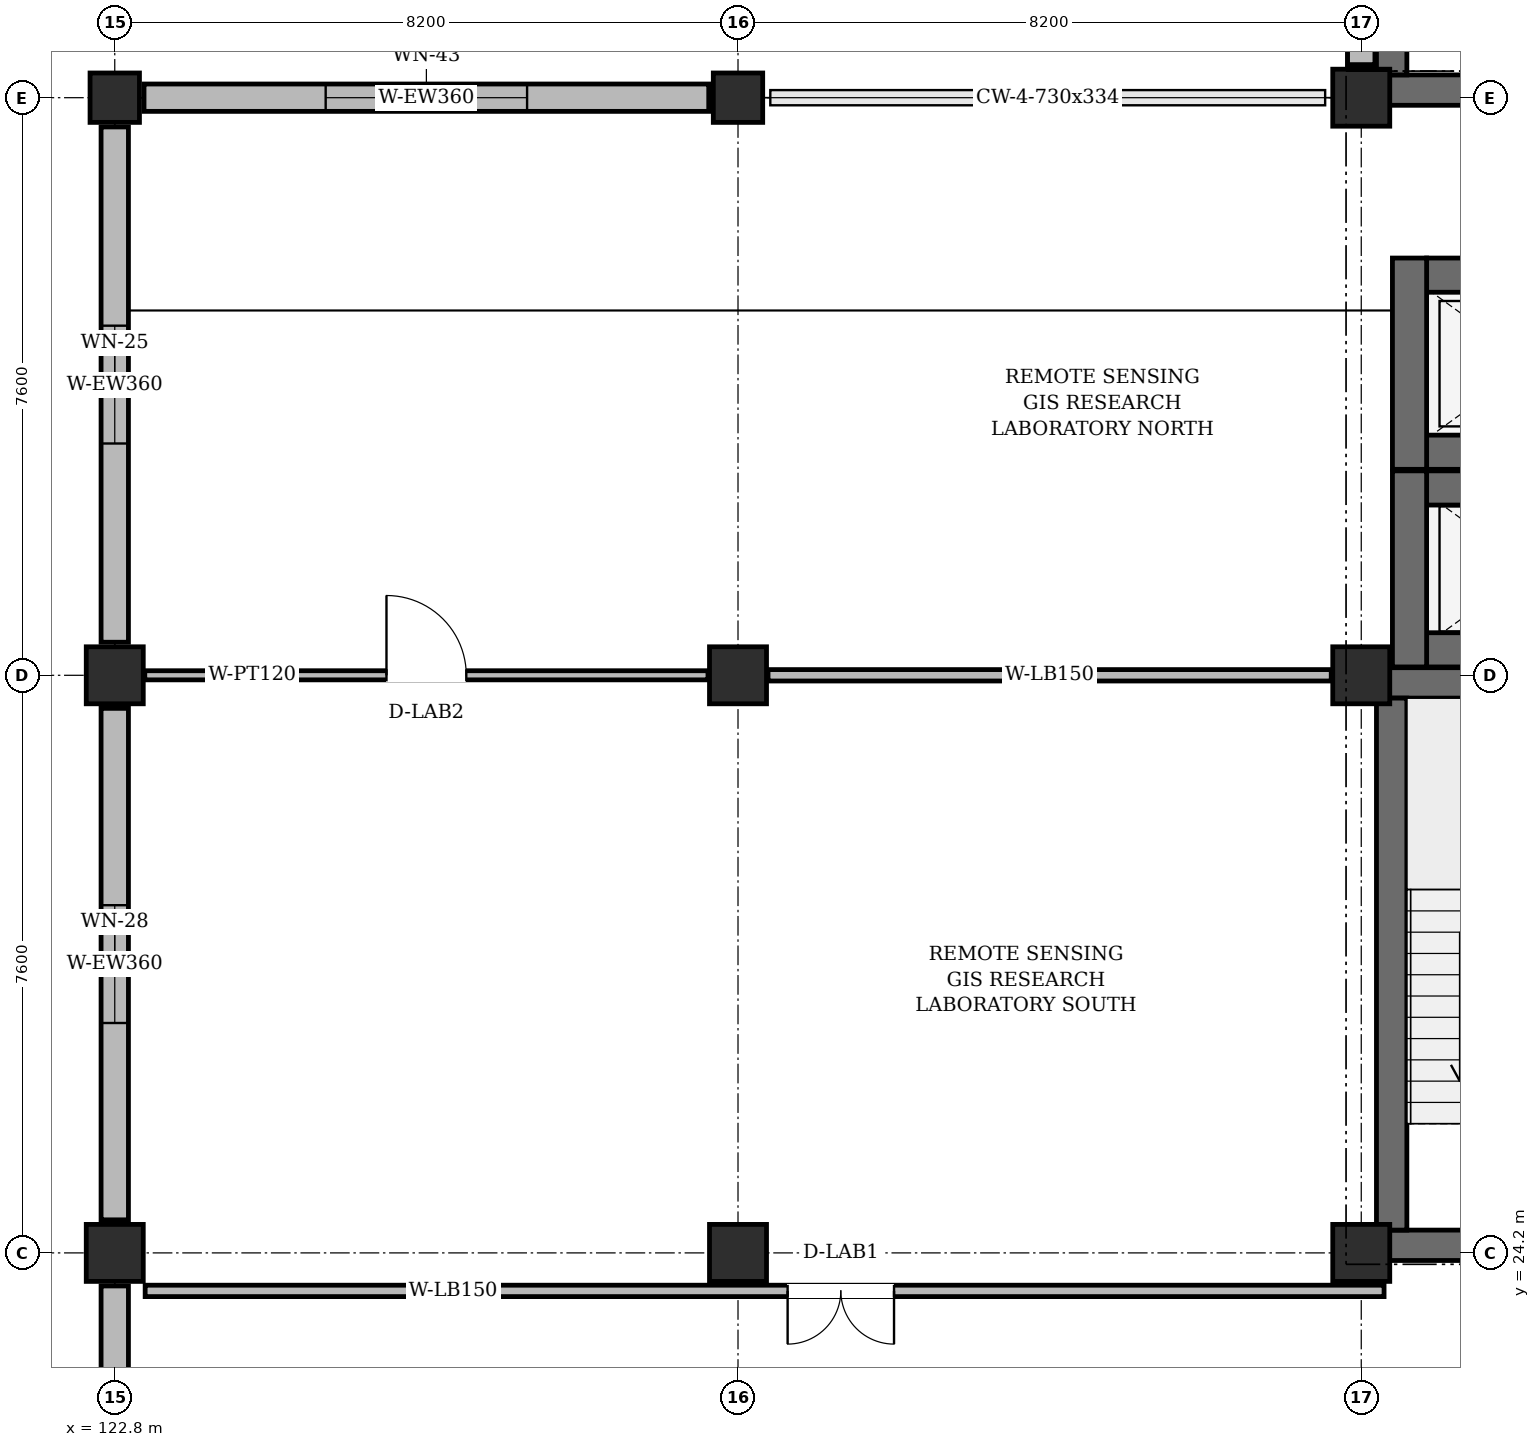
"""IFC4 building model, lengths in metres.
Left out: names, types, materials, properties, quantities, classifications, styles, units other than length and angle.
Written with IfcOpenShell. Run it as: python <this file> out.ifc"""

import sys

from ifc_helpers import new_model, si_unit, direction, frame, frame_2d, origin, origin_2d, place, context, subcontext, project, spatial, rectangle, extrude, element, fill, save


model = new_model("IFC4")
c1 = context("Model", 3, precision=1e-05, world=origin(), true_north=direction((0.0, 1.0)))
c2 = subcontext(c1, "Body", "Model", "MODEL_VIEW")
j1 = project(units=[si_unit("LENGTHUNIT", "METRE"), si_unit("PLANEANGLEUNIT", "RADIAN")], contexts=[c1])
p1 = place(None, origin())
s1 = spatial("IfcSite", under=j1, at=p1, CompositionType="ELEMENT")
p2 = place(p1, origin())
s2 = spatial("IfcBuilding", under=s1, at=p2, CompositionType="ELEMENT")
p3 = place(p2, frame((0.0, 0.0, 49.2)))
s3 = spatial("IfcBuildingStorey", under=s2, at=p3, CompositionType="ELEMENT", Elevation=49.2)
for number, where, z_axis, x_axis in (
    (1, (122.8, 24.2, 0.0), (0.0, 0.0, 1.0), (1.0, 0.0, 0.0)),
    (2, (122.8, 31.8, 0.0), (0.0, 0.0, 1.0), (1.0, 0.0, 0.0)),
):
    element("IfcColumn", number, at=place(p3, frame(where, z_axis=z_axis, x_axis=x_axis)), inside=s3, PredefinedType="COLUMN", context=c2, shape_type="SweptSolid", body=[
        extrude(rectangle(XDim=0.75, YDim=0.75, at=origin_2d()), origin(), (0.0, 0.0, 1.0), 3.945),
    ])
p4 = place(p3, frame((122.8, 39.4, 0.0), z_axis=(0.0, 0.0, 1.0), x_axis=(1.0, 0.0, 0.0)))
e3 = element("IfcColumn", 3, at=p4, inside=s3, PredefinedType="COLUMN", context=c2, shape_type="SweptSolid", body=[
    extrude(rectangle(XDim=0.65, YDim=0.65, at=origin_2d()), origin(), (0.0, 0.0, 1.0), 3.945),
])
p5 = place(p3, frame((131.0, 24.2, 0.0), z_axis=(0.0, 0.0, 1.0), x_axis=(1.0, 0.0, 0.0)))
e4 = element("IfcColumn", 4, at=p5, inside=s3, PredefinedType="COLUMN", context=c2, shape_type="SweptSolid", body=[
    extrude(rectangle(XDim=0.75, YDim=0.75, at=origin_2d()), origin(), (0.0, 0.0, 1.0), 3.9),
])
p6 = place(p3, frame((131.0, 31.8, 0.0), z_axis=(0.0, 0.0, 1.0), x_axis=(1.0, 0.0, 0.0)))
e5 = element("IfcColumn", 5, at=p6, inside=s3, PredefinedType="COLUMN", context=c2, shape_type="SweptSolid", body=[
    extrude(rectangle(XDim=0.75, YDim=0.75, at=origin_2d()), origin(), (0.0, 0.0, 1.0), 3.945),
])
p7 = place(p3, frame((131.0, 39.4, 0.0), z_axis=(0.0, 0.0, 1.0), x_axis=(1.0, 0.0, 0.0)))
e6 = element("IfcColumn", 6, at=p7, inside=s3, PredefinedType="COLUMN", context=c2, shape_type="SweptSolid", body=[
    extrude(rectangle(XDim=0.65, YDim=0.65, at=origin_2d()), origin(), (0.0, 0.0, 1.0), 3.945),
])
for number, where, z_axis, x_axis in (
    (7, (139.2, 24.2, 0.0), (0.0, 0.0, 1.0), (1.0, 0.0, 0.0)),
    (8, (139.2, 31.8, 0.0), (0.0, 0.0, 1.0), (1.0, 0.0, 0.0)),
    (9, (139.2, 39.4, 0.0), (0.0, 0.0, 1.0), (1.0, 0.0, 0.0)),
):
    element("IfcColumn", number, at=place(p3, frame(where, z_axis=z_axis, x_axis=x_axis)), inside=s3, PredefinedType="COLUMN", context=c2, shape_type="SweptSolid", body=[
        extrude(rectangle(XDim=0.75, YDim=0.75, at=origin_2d()), origin(), (0.0, 0.0, 1.0), 3.9),
    ])
p8 = place(p3, frame((139.2, 46.565, 0.0), z_axis=(0.0, 0.0, 1.0), x_axis=(0.0, -1.0, 0.0)))
e10 = element("IfcWall", 10, at=p8, inside=s3, PredefinedType="SOLIDWALL", context=c2, shape_type="SweptSolid", body=[
    extrude(rectangle(XDim=6.73, YDim=0.36, at=frame_2d((3.365, 0.0))), origin(), (0.0, 0.0, 1.0), 3.285),
])
p9 = place(p3, frame((130.615, 39.4, 0.0), z_axis=(0.0, 0.0, 1.0), x_axis=(-1.0, 0.0, 0.0)))
e11 = element("IfcWall", 11, at=p9, inside=s3, PredefinedType="SOLIDWALL", context=c2, shape_type="SweptSolid", body=[
    extrude(rectangle(XDim=7.43, YDim=0.36, at=frame_2d((3.715, 0.0))), origin(), (0.0, 0.0, 1.0), 3.33),
])
p10 = place(p9, frame((2.39, 0.0, 0.95)))
e12 = element("IfcOpeningElement", 12, at=p10, cuts=e11, PredefinedType="OPENING", context=c2, shape_type="SweptSolid", body=[
    extrude(rectangle(XDim=2.65, YDim=1.75, at=frame_2d((1.325, 0.875))), frame((0.0, 0.192, 0.0), z_axis=(0.0, -1.0, 0.0), x_axis=(1.0, 0.0, 0.0)), (0.0, 0.0, 1.0), 0.384),
])
p11 = place(p3, frame((122.8, 39.015, 0.0), z_axis=(0.0, 0.0, 1.0), x_axis=(0.0, -1.0, 0.0)))
e13 = element("IfcWall", 13, at=p11, inside=s3, PredefinedType="SOLIDWALL", context=c2, shape_type="SweptSolid", body=[
    extrude(rectangle(XDim=6.78, YDim=0.36, at=frame_2d((3.39, 0.0))), origin(), (0.0, 0.0, 1.0), 3.33),
])
p12 = place(p11, frame((2.615, 0.0, 0.95)))
e14 = element("IfcOpeningElement", 14, at=p12, cuts=e13, PredefinedType="OPENING", context=c2, shape_type="SweptSolid", body=[
    extrude(rectangle(XDim=1.55, YDim=1.25, at=frame_2d((0.775, 0.625))), frame((0.0, 0.192, 0.0), z_axis=(0.0, -1.0, 0.0), x_axis=(1.0, 0.0, 0.0)), (0.0, 0.0, 1.0), 0.384),
])
p13 = place(p3, frame((122.8, 31.365, 0.0), z_axis=(0.0, 0.0, 1.0), x_axis=(0.0, -1.0, 0.0)))
e15 = element("IfcWall", 15, at=p13, inside=s3, PredefinedType="SOLIDWALL", context=c2, shape_type="SweptSolid", body=[
    extrude(rectangle(XDim=6.73, YDim=0.36, at=frame_2d((3.365, 0.0))), origin(), (0.0, 0.0, 1.0), 3.33),
])
p14 = place(p13, frame((2.59, 0.0, 0.95)))
e16 = element("IfcOpeningElement", 16, at=p14, cuts=e15, PredefinedType="OPENING", context=c2, shape_type="SweptSolid", body=[
    extrude(rectangle(XDim=1.55, YDim=2.05, at=frame_2d((0.775, 1.025))), frame((0.0, 0.192, 0.0), z_axis=(0.0, -1.0, 0.0), x_axis=(1.0, 0.0, 0.0)), (0.0, 0.0, 1.0), 0.384),
])
p15 = place(p3, frame((122.8, 23.765, 0.0), z_axis=(0.0, 0.0, 1.0), x_axis=(0.0, -1.0, 0.0)))
e17 = element("IfcWall", 17, at=p15, inside=s3, PredefinedType="SOLIDWALL", context=c2, shape_type="SweptSolid", body=[
    extrude(rectangle(XDim=6.73, YDim=0.36, at=frame_2d((3.365, 0.0))), origin(), (0.0, 0.0, 1.0), 3.33),
])
p16 = place(p15, frame((2.99, 0.0, 0.95)))
e18 = element("IfcOpeningElement", 18, at=p16, cuts=e17, PredefinedType="OPENING", context=c2, shape_type="SweptSolid", body=[
    extrude(rectangle(XDim=0.75, YDim=1.8, at=frame_2d((0.375, 0.9))), frame((0.0, 0.192, 0.0), z_axis=(0.0, -1.0, 0.0), x_axis=(1.0, 0.0, 0.0)), (0.0, 0.0, 1.0), 0.384),
])
p17 = place(p3, frame((139.4, 24.3, 0.0), z_axis=(0.0, 0.0, 1.0), x_axis=(1.0, 0.0, 0.0)))
e19 = element("IfcWall", 19, at=p17, inside=s3, PredefinedType="SHEAR", context=c2, shape_type="SweptSolid", body=[
    extrude(rectangle(XDim=3.8, YDim=0.4, at=frame_2d((1.9, 0.0))), origin(), (0.0, 0.0, 1.0), 3.9),
])
p18 = place(p17, frame((1.3, 0.0, 0.0)))
e20 = element("IfcOpeningElement", 20, at=p18, cuts=e19, PredefinedType="OPENING", context=c2, shape_type="SweptSolid", body=[
    extrude(rectangle(XDim=1.2, YDim=2.2, at=frame_2d((0.6, 1.1))), frame((0.0, 0.212, 0.0), z_axis=(0.0, -1.0, 0.0), x_axis=(1.0, 0.0, 0.0)), (0.0, 0.0, 1.0), 0.424),
])
p19 = place(p3, frame((139.4, 31.7, 0.0), z_axis=(0.0, 0.0, 1.0), x_axis=(1.0, 0.0, 0.0)))
e21 = element("IfcWall", 21, at=p19, inside=s3, PredefinedType="SHEAR", context=c2, shape_type="SweptSolid", body=[
    extrude(rectangle(XDim=3.8, YDim=0.4, at=frame_2d((1.9, 0.0))), origin(), (0.0, 0.0, 1.0), 3.9),
])
p20 = place(p3, frame((139.6, 24.5, 0.0), z_axis=(0.0, 0.0, 1.0), x_axis=(0.0, 1.0, 0.0)))
e22 = element("IfcWall", 22, at=p20, inside=s3, PredefinedType="SHEAR", context=c2, shape_type="SweptSolid", body=[
    extrude(rectangle(XDim=7.0, YDim=0.4, at=frame_2d((3.5, 0.0))), origin(), (0.0, 0.0, 1.0), 3.9),
])
p21 = place(p3, frame((139.4, 39.5, 0.0), z_axis=(0.0, 0.0, 1.0), x_axis=(1.0, 0.0, 0.0)))
e23 = element("IfcWall", 23, at=p21, inside=s3, PredefinedType="SHEAR", context=c2, shape_type="SweptSolid", body=[
    extrude(rectangle(XDim=3.8, YDim=0.4, at=frame_2d((1.9, 0.0))), origin(), (0.0, 0.0, 1.0), 3.9),
])
p22 = place(p21, frame((1.3, 0.0, 0.0)))
e24 = element("IfcOpeningElement", 24, at=p22, cuts=e23, PredefinedType="OPENING", context=c2, shape_type="SweptSolid", body=[
    extrude(rectangle(XDim=1.2, YDim=2.2, at=frame_2d((0.6, 1.1))), frame((0.0, 0.212, 0.0), z_axis=(0.0, -1.0, 0.0), x_axis=(1.0, 0.0, 0.0)), (0.0, 0.0, 1.0), 0.424),
])
p23 = place(p3, frame((139.6, 39.7, 0.0), z_axis=(0.0, 0.0, 1.0), x_axis=(0.0, 1.0, 0.0)))
e25 = element("IfcWall", 25, at=p23, inside=s3, PredefinedType="SHEAR", context=c2, shape_type="SweptSolid", body=[
    extrude(rectangle(XDim=7.0, YDim=0.4, at=frame_2d((3.5, 0.0))), origin(), (0.0, 0.0, 1.0), 3.9),
])
for number, where, z_axis, x_axis in (
    (26, (140.06, 32.135, 0.0), (0.0, 0.0, 1.0), (1.0, 0.0, 0.0)),
    (27, (140.06, 34.265, 0.0), (0.0, 0.0, 1.0), (1.0, 0.0, 0.0)),
):
    element("IfcWall", number, at=place(p3, frame(where, z_axis=z_axis, x_axis=x_axis)), inside=s3, PredefinedType="SHEAR", context=c2, shape_type="SweptSolid", body=[
        extrude(rectangle(XDim=2.74, YDim=0.45, at=frame_2d((1.37, 0.0))), origin(), (0.0, 0.0, 1.0), 3.9),
    ])
p24 = place(p3, frame((139.835, 31.91, 0.0), z_axis=(0.0, 0.0, 1.0), x_axis=(0.0, 1.0, 0.0)))
e28 = element("IfcWall", 28, at=p24, inside=s3, PredefinedType="SHEAR", context=c2, shape_type="SweptSolid", body=[
    extrude(rectangle(XDim=2.58, YDim=0.45, at=frame_2d((1.29, 0.0))), origin(), (0.0, 0.0, 1.0), 3.9),
])
for number, where, z_axis, x_axis in (
    (29, (140.06, 34.735, 0.0), (0.0, 0.0, 1.0), (1.0, 0.0, 0.0)),
    (30, (140.06, 37.065, 0.0), (0.0, 0.0, 1.0), (1.0, 0.0, 0.0)),
):
    element("IfcWall", number, at=place(p3, frame(where, z_axis=z_axis, x_axis=x_axis)), inside=s3, PredefinedType="SHEAR", context=c2, shape_type="SweptSolid", body=[
        extrude(rectangle(XDim=2.74, YDim=0.45, at=frame_2d((1.37, 0.0))), origin(), (0.0, 0.0, 1.0), 3.9),
    ])
p25 = place(p3, frame((139.835, 34.51, 0.0), z_axis=(0.0, 0.0, 1.0), x_axis=(0.0, 1.0, 0.0)))
e31 = element("IfcWall", 31, at=p25, inside=s3, PredefinedType="SHEAR", context=c2, shape_type="SweptSolid", body=[
    extrude(rectangle(XDim=2.78, YDim=0.45, at=frame_2d((1.39, 0.0))), origin(), (0.0, 0.0, 1.0), 3.9),
])
p26 = place(p3, frame((123.2, 23.7, 0.0), z_axis=(0.0, 0.0, 1.0), x_axis=(1.0, 0.0, 0.0)))
e32 = element("IfcWall", 32, at=p26, inside=s3, PredefinedType="PARTITIONING", context=c2, shape_type="SweptSolid", body=[
    extrude(rectangle(XDim=16.3, YDim=0.15, at=frame_2d((8.15, 0.0))), origin(), (0.0, 0.0, 1.0), 3.805),
])
p27 = place(p26, frame((8.453, 0.0, 0.0)))
e33 = element("IfcOpeningElement", 33, at=p27, cuts=e32, PredefinedType="OPENING", context=c2, shape_type="SweptSolid", body=[
    extrude(rectangle(XDim=1.4, YDim=2.2, at=frame_2d((0.7, 1.1))), frame((0.0, 0.087, 0.0), z_axis=(0.0, -1.0, 0.0), x_axis=(1.0, 0.0, 0.0)), (0.0, 0.0, 1.0), 0.174),
])
p28 = place(p3, frame((123.195, 31.8, 0.0), z_axis=(0.0, 0.0, 1.0), x_axis=(1.0, 0.0, 0.0)))
e34 = element("IfcWall", 34, at=p28, inside=s3, PredefinedType="PARTITIONING", context=c2, shape_type="SweptSolid", body=[
    extrude(rectangle(XDim=7.41, YDim=0.12, at=frame_2d((3.705, 0.0))), origin(), (0.0, 0.0, 1.0), 3.33),
])
p29 = place(p28, frame((3.18, 0.0, 0.0)))
e35 = element("IfcOpeningElement", 35, at=p29, cuts=e34, PredefinedType="OPENING", context=c2, shape_type="SweptSolid", body=[
    extrude(rectangle(XDim=1.05, YDim=2.2, at=frame_2d((0.525, 1.1))), frame((0.0, 0.072, 0.0), z_axis=(0.0, -1.0, 0.0), x_axis=(1.0, 0.0, 0.0)), (0.0, 0.0, 1.0), 0.144),
])
p30 = place(p3, frame((131.395, 31.8, 0.0), z_axis=(0.0, 0.0, 1.0), x_axis=(1.0, 0.0, 0.0)))
e36 = element("IfcWall", 36, at=p30, inside=s3, PredefinedType="PARTITIONING", context=c2, shape_type="SweptSolid", body=[
    extrude(rectangle(XDim=7.41, YDim=0.15, at=frame_2d((3.705, 0.0))), origin(), (0.0, 0.0, 1.0), 3.33),
])
p31 = place(p10, origin())
e37 = element("IfcWindow", 37, at=p31, inside=s3, PartitioningType="DOUBLE_PANEL_VERTICAL", PredefinedType="WINDOW", context=c2, shape_type="SweptSolid", body=[
    extrude(rectangle(XDim=2.65, YDim=1.75, at=frame_2d((1.325, 0.875))), frame((0.0, 0.03, 0.0), z_axis=(0.0, -1.0, 0.0), x_axis=(1.0, 0.0, 0.0)), (0.0, 0.0, 1.0), 0.06),
])
fill(e12, e37)
p32 = place(p12, origin())
e38 = element("IfcWindow", 38, at=p32, inside=s3, PartitioningType="DOUBLE_PANEL_VERTICAL", PredefinedType="WINDOW", context=c2, shape_type="SweptSolid", body=[
    extrude(rectangle(XDim=1.55, YDim=1.25, at=frame_2d((0.775, 0.625))), frame((0.0, 0.03, 0.0), z_axis=(0.0, -1.0, 0.0), x_axis=(1.0, 0.0, 0.0)), (0.0, 0.0, 1.0), 0.06),
])
fill(e14, e38)
p33 = place(p14, origin())
e39 = element("IfcWindow", 39, at=p33, inside=s3, PartitioningType="DOUBLE_PANEL_VERTICAL", PredefinedType="WINDOW", context=c2, shape_type="SweptSolid", body=[
    extrude(rectangle(XDim=1.55, YDim=2.05, at=frame_2d((0.775, 1.025))), frame((0.0, 0.03, 0.0), z_axis=(0.0, -1.0, 0.0), x_axis=(1.0, 0.0, 0.0)), (0.0, 0.0, 1.0), 0.06),
])
fill(e16, e39)
p34 = place(p27, frame((1.4, 0.0, 0.0), z_axis=(0.0, 0.0, 1.0), x_axis=(-1.0, 0.0, 0.0)))
e40 = element("IfcDoor", 40, at=p34, inside=s3, OperationType="DOUBLE_DOOR_SINGLE_SWING", PredefinedType="DOOR", context=c2, shape_type="SweptSolid", body=[
    extrude(rectangle(XDim=1.4, YDim=2.2, at=frame_2d((0.7, 1.1))), frame((0.0, 0.025, 0.0), z_axis=(0.0, -1.0, 0.0), x_axis=(1.0, 0.0, 0.0)), (0.0, 0.0, 1.0), 0.05),
])
fill(e33, e40)
p35 = place(p29, origin())
e41 = element("IfcDoor", 41, at=p35, inside=s3, OperationType="SINGLE_SWING_LEFT", PredefinedType="DOOR", context=c2, shape_type="SweptSolid", body=[
    extrude(rectangle(XDim=1.05, YDim=2.2, at=frame_2d((0.525, 1.1))), frame((0.0, 0.025, 0.0), z_axis=(0.0, -1.0, 0.0), x_axis=(1.0, 0.0, 0.0)), (0.0, 0.0, 1.0), 0.05),
])
fill(e35, e41)
save(model, sys.argv[1])
